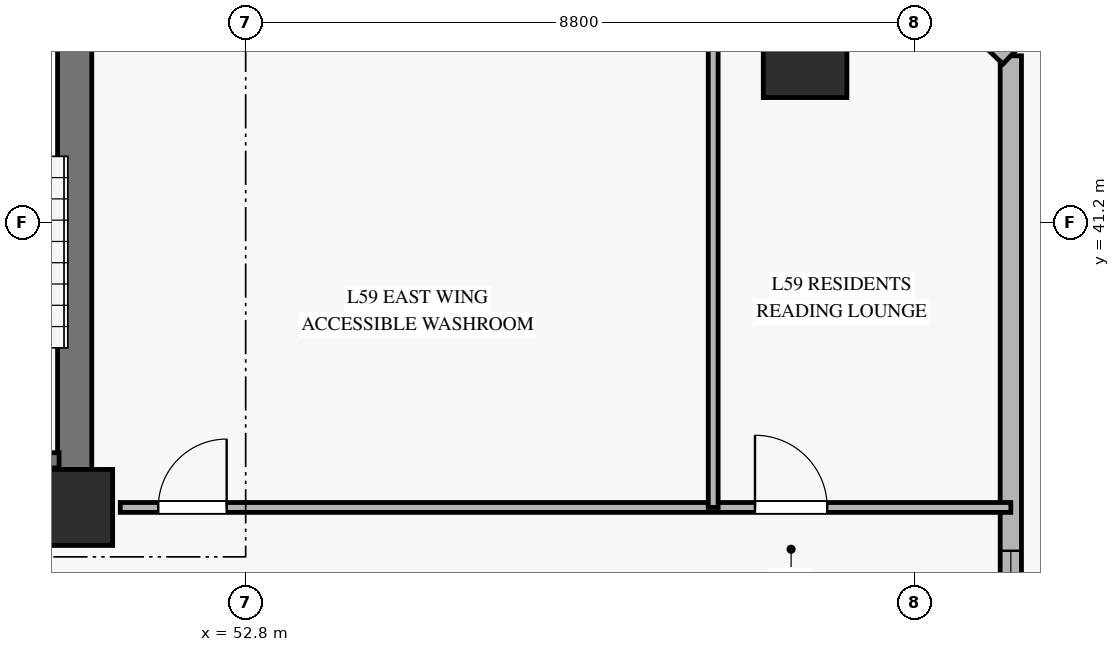
"""IFC4 building model, lengths in metres.
Left out: names, types, materials, properties, quantities, classifications, styles, units other than length and angle.
Written with IfcOpenShell. Run it as: python <this file> out.ifc"""

import sys

from ifc_helpers import new_model, si_unit, direction, frame, frame_2d, origin, origin_2d, place, context, subcontext, project, spatial, rectangle, hollow_rectangle, extrude, source, transform, mapped, element, fill, save


model = new_model("IFC4")
c1 = context("Model", 3, precision=1e-05, world=origin(), true_north=direction((0.0, 1.0)))
c2 = subcontext(c1, "Body", "Model", "MODEL_VIEW")
j1 = project(units=[si_unit("LENGTHUNIT", "METRE"), si_unit("PLANEANGLEUNIT", "RADIAN")], contexts=[c1])
p1 = place(None, origin())
s1 = spatial("IfcSite", under=j1, at=p1, CompositionType="ELEMENT")
p2 = place(p1, origin())
s2 = spatial("IfcBuilding", under=s1, at=p2, CompositionType="ELEMENT")
p3 = place(p2, frame((0.0, 0.0, 233.8)))
s3 = spatial("IfcBuildingStorey", under=s2, at=p3, CompositionType="ELEMENT", Elevation=233.8)
m1 = source(origin(), c2, "Body", "SweptSolid", [
    extrude(rectangle(XDim=1.0, YDim=1.0, at=origin_2d()), origin(), (0.0, 0.0, 1.0), 3.12),
])
p4 = place(p3, frame((50.55, 37.45, 0.0), z_axis=(0.0, 0.0, 1.0), x_axis=(1.0, 0.0, 0.0)))
e1 = element("IfcColumn", 1, at=p4, inside=s3, PredefinedType="PILASTER", context=c2, shape_type="MappedRepresentation", body=[
    mapped(m1, transform((0.0, 0.0, 0.0), x_axis=(1.0, 0.0, 0.0), y_axis=(0.0, 1.0, 0.0), z_axis=(0.0, 0.0, 1.0), scale=1.0)),
])
p5 = place(p3, frame((50.55, 37.95, 0.0), z_axis=(0.0, 0.0, 1.0), x_axis=(0.0, 1.0, 0.0)))
e2 = element("IfcWall", 2, at=p5, inside=s3, PredefinedType="SHEAR", context=c2, shape_type="SweptSolid", body=[
    extrude(rectangle(XDim=8.1, YDim=0.45, at=frame_2d((4.05, 0.0))), origin(), (0.0, 0.0, 1.0), 3.12),
])
m2 = source(origin(), c2, "Body", "SweptSolid", [
    extrude(hollow_rectangle(XDim=1.1, YDim=1.1, WallThickness=0.05, at=origin_2d()), origin(), (0.0, 0.0, 1.0), 3.142),
])
p6 = place(p3, frame((60.16, 43.393, 0.0), z_axis=(-0.117410344374, 0.014608302278, 0.992976036236), x_axis=(-0.1234688995, -0.99234844226, 0.0)))
e3 = element("IfcColumn", 3, at=p6, inside=s3, PredefinedType="COLUMN", context=c2, shape_type="MappedRepresentation", body=[
    mapped(m2, transform((0.0, 0.0, 0.0), x_axis=(1.0, 0.0, 0.0), y_axis=(0.0, 1.0, 0.0), z_axis=(0.0, 0.0, 1.0), scale=1.0)),
])
p7 = place(p3, frame((62.867, 29.975, 0.0), z_axis=(0.0, 0.0, 1.0), x_axis=(0.0, 1.0, 0.0)))
e4 = element("IfcWall", 4, at=p7, inside=s3, PredefinedType="SOLIDWALL", context=c2, shape_type="SweptSolid", body=[
    extrude(rectangle(XDim=13.418, YDim=0.28, at=frame_2d((6.709, 0.0))), origin(), (0.0, 0.0, 1.0), 2.75),
])
p8 = place(p7, frame((5.705, 0.0, 0.45)))
e5 = element("IfcOpeningElement", 5, at=p8, cuts=e4, PredefinedType="OPENING", context=c2, shape_type="SweptSolid", body=[
    extrude(rectangle(XDim=1.2, YDim=2.0, at=frame_2d((0.6, 1.0))), frame((0.0, 0.15, 0.0), z_axis=(0.0, -1.0, 0.0), x_axis=(1.0, 0.0, 0.0)), (0.0, 0.0, 1.0), 0.3),
])
p9 = place(p3, frame((62.867, 43.393, 0.0), z_axis=(0.0, 0.0, 1.0), x_axis=(-0.724946525113, 0.688805150769, 0.0)))
e6 = element("IfcWall", 6, at=p9, inside=s3, PredefinedType="SOLIDWALL", context=c2, shape_type="SweptSolid", body=[
    extrude(rectangle(XDim=4.148, YDim=0.3, at=frame_2d((2.074, 0.0))), origin(), (0.0, 0.0, 1.0), 2.75),
])
p10 = place(p9, frame((1.274, 0.0, 0.45)))
e7 = element("IfcOpeningElement", 7, at=p10, cuts=e6, PredefinedType="OPENING", context=c2, shape_type="SweptSolid", body=[
    extrude(rectangle(XDim=1.6, YDim=2.0, at=frame_2d((0.8, 1.0))), frame((0.0, 0.16, 0.0), z_axis=(0.0, -1.0, 0.0), x_axis=(1.0, 0.0, 0.0)), (0.0, 0.0, 1.0), 0.32),
])
p11 = place(p3, frame((47.44, 38.07, 0.0), z_axis=(0.0, 0.0, 1.0), x_axis=(1.0, 0.0, 0.0)))
e8 = element("IfcWall", 8, at=p11, inside=s3, PredefinedType="SOLIDWALL", context=c2, shape_type="SweptSolid", body=[
    extrude(rectangle(XDim=2.905, YDim=0.2, at=frame_2d((1.453, 0.0))), origin(), (0.0, 0.0, 1.0), 3.4),
])
p12 = place(p3, frame((51.15, 37.45, 0.0), z_axis=(0.0, 0.0, 1.0), x_axis=(1.0, 0.0, 0.0)))
e9 = element("IfcWall", 9, at=p12, inside=s3, PredefinedType="PARTITIONING", context=c2, shape_type="SweptSolid", body=[
    extrude(rectangle(XDim=11.717, YDim=0.13, at=frame_2d((5.858, 0.0))), origin(), (0.0, 0.0, 1.0), 2.755),
])
p13 = place(p12, frame((0.5, 0.0, 0.0)))
e10 = element("IfcOpeningElement", 10, at=p13, cuts=e9, PredefinedType="OPENING", context=c2, shape_type="SweptSolid", body=[
    extrude(rectangle(XDim=0.9, YDim=2.1, at=frame_2d((0.45, 1.05))), frame((0.0, 0.075, 0.0), z_axis=(0.0, -1.0, 0.0), x_axis=(1.0, 0.0, 0.0)), (0.0, 0.0, 1.0), 0.15),
])
p14 = place(p12, frame((8.351, 0.0, 0.0)))
e11 = element("IfcOpeningElement", 11, at=p14, cuts=e9, PredefinedType="OPENING", context=c2, shape_type="SweptSolid", body=[
    extrude(rectangle(XDim=0.95, YDim=2.1, at=frame_2d((0.475, 1.05))), frame((0.0, 0.075, 0.0), z_axis=(0.0, -1.0, 0.0), x_axis=(1.0, 0.0, 0.0)), (0.0, 0.0, 1.0), 0.15),
])
p15 = place(p3, frame((58.951, 37.45, 0.0), z_axis=(0.0, 0.0, 1.0), x_axis=(0.0, 1.0, 0.0)))
e12 = element("IfcWall", 12, at=p15, inside=s3, PredefinedType="PARTITIONING", context=c2, shape_type="SweptSolid", body=[
    extrude(rectangle(XDim=8.8, YDim=0.13, at=frame_2d((4.4, 0.0))), origin(), (0.0, 0.0, 1.0), 3.12),
])
m3 = source(origin(), c2, "Body", "SweptSolid", [
    extrude(rectangle(XDim=1.2, YDim=2.0, at=frame_2d((0.6, 1.0))), frame((0.0, 0.03, 0.0), z_axis=(0.0, -1.0, 0.0), x_axis=(1.0, 0.0, 0.0)), (0.0, 0.0, 1.0), 0.06),
])
p16 = place(p8, origin())
e13 = element("IfcWindow", 13, at=p16, inside=s3, PartitioningType="SINGLE_PANEL", PredefinedType="WINDOW", context=c2, shape_type="MappedRepresentation", body=[
    mapped(m3, transform((0.0, 0.0, 0.0), x_axis=(1.0, 0.0, 0.0), y_axis=(0.0, 1.0, 0.0), z_axis=(0.0, 0.0, 1.0), scale=1.0)),
])
fill(e5, e13)
m4 = source(origin(), c2, "Body", "SweptSolid", [
    extrude(rectangle(XDim=0.9, YDim=2.1, at=frame_2d((0.45, 1.05))), frame((0.0, 0.025, 0.0), z_axis=(0.0, -1.0, 0.0), x_axis=(1.0, 0.0, 0.0)), (0.0, 0.0, 1.0), 0.05),
])
p17 = place(p13, origin())
e14 = element("IfcDoor", 14, at=p17, inside=s3, OperationType="SINGLE_SWING_RIGHT", PredefinedType="DOOR", context=c2, shape_type="MappedRepresentation", body=[
    mapped(m4, transform((0.0, 0.0, 0.0), x_axis=(1.0, 0.0, 0.0), y_axis=(0.0, 1.0, 0.0), z_axis=(0.0, 0.0, 1.0), scale=1.0)),
])
fill(e10, e14)
m5 = source(origin(), c2, "Body", "SweptSolid", [
    extrude(rectangle(XDim=0.95, YDim=2.1, at=frame_2d((0.475, 1.05))), frame((0.0, 0.025, 0.0), z_axis=(0.0, -1.0, 0.0), x_axis=(1.0, 0.0, 0.0)), (0.0, 0.0, 1.0), 0.05),
])
p18 = place(p14, origin())
e15 = element("IfcDoor", 15, at=p18, inside=s3, OperationType="SINGLE_SWING_LEFT", PredefinedType="DOOR", context=c2, shape_type="MappedRepresentation", body=[
    mapped(m5, transform((0.0, 0.0, 0.0), x_axis=(1.0, 0.0, 0.0), y_axis=(0.0, 1.0, 0.0), z_axis=(0.0, 0.0, 1.0), scale=1.0)),
])
fill(e11, e15)
save(model, sys.argv[1])
